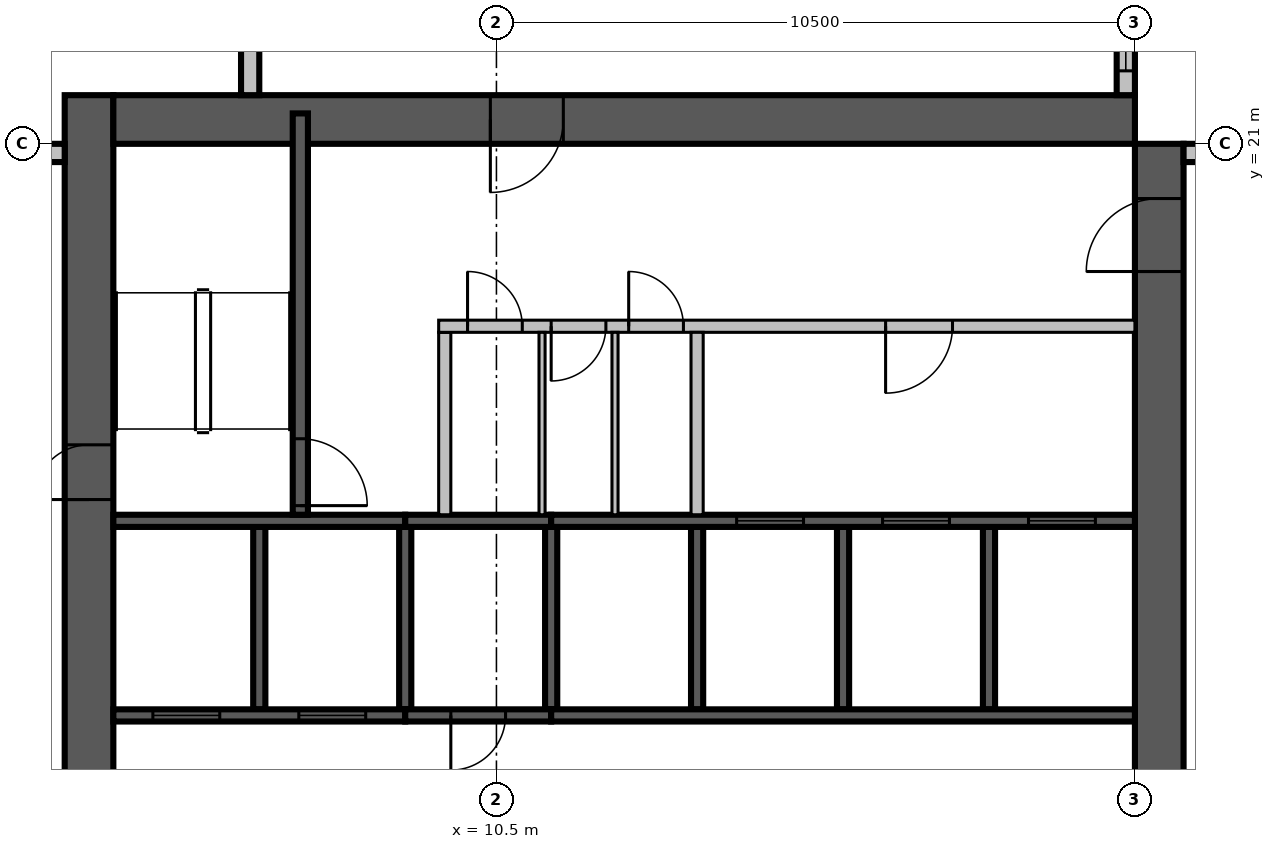
"""IFC4 building model, lengths in metres.
Left out: names, types, materials, properties, quantities, classifications, styles, units other than length and angle.
Written with IfcOpenShell. Run it as: python <this file> out.ifc"""

import sys

from ifc_helpers import new_model, si_unit, direction, frame, frame_2d, origin, place, context, subcontext, project, spatial, rectangle, extrude, source, transform, mapped, element, fill, save


model = new_model("IFC4")
c1 = context("Model", 3, precision=1e-05, world=origin(), true_north=direction((0.0, 1.0)))
c2 = subcontext(c1, "Body", "Model", "MODEL_VIEW")
j1 = project(units=[si_unit("LENGTHUNIT", "METRE"), si_unit("PLANEANGLEUNIT", "RADIAN")], contexts=[c1])
p1 = place(None, origin())
s1 = spatial("IfcSite", under=j1, at=p1, CompositionType="ELEMENT")
p2 = place(p1, origin())
s2 = spatial("IfcBuilding", under=s1, at=p2, CompositionType="ELEMENT")
p3 = place(p2, frame((0.0, 0.0, 246.2)))
s3 = spatial("IfcBuildingStorey", under=s2, at=p3, CompositionType="ELEMENT", Elevation=246.2)
m1 = source(origin(), c2, "Body", "SweptSolid", [
    extrude(rectangle(XDim=17.6, YDim=0.8, at=frame_2d((8.8, 0.0))), origin(), (0.0, 0.0, 1.0), 3.8),
])
p4 = place(p3, frame((3.8, 4.2, 0.0), z_axis=(0.0, 0.0, 1.0), x_axis=(0.0, 1.0, 0.0)))
e1 = element("IfcWall", 1, at=p4, inside=s3, PredefinedType="SHEAR", context=c2, shape_type="MappedRepresentation", body=[
    mapped(m1, transform((0.0, 0.0, 0.0), scale=1.0)),
])
m2 = source(origin(), c2, "Body", "SweptSolid", [
    extrude(rectangle(XDim=2.2, YDim=2.1, at=frame_2d((1.1, 1.05))), frame((0.0, 0.41, 0.0), z_axis=(0.0, -1.0, 0.0), x_axis=(1.0, 0.0, 0.0)), (0.0, 0.0, 1.0), 0.82),
])
p5 = place(p4, frame((4.2, 0.0, 0.0)))
e2 = element("IfcOpeningElement", 2, at=p5, cuts=e1, PredefinedType="OPENING", context=c2, shape_type="MappedRepresentation", body=[
    mapped(m2, transform((0.0, 0.0, 0.0), scale=1.0)),
])
m3 = source(origin(), c2, "Body", "SweptSolid", [
    extrude(rectangle(XDim=0.9, YDim=2.1, at=frame_2d((0.45, 1.05))), frame((0.0, 0.41, 0.0), z_axis=(0.0, -1.0, 0.0), x_axis=(1.0, 0.0, 0.0)), (0.0, 0.0, 1.0), 0.82),
])
p6 = place(p4, frame((10.95, 0.0, 0.0)))
e3 = element("IfcOpeningElement", 3, at=p6, cuts=e1, PredefinedType="OPENING", context=c2, shape_type="MappedRepresentation", body=[
    mapped(m3, transform((0.0, 0.0, 0.0), scale=1.0)),
])
m4 = source(origin(), c2, "Body", "SweptSolid", [
    extrude(rectangle(XDim=16.8, YDim=0.8, at=frame_2d((8.4, 0.0))), origin(), (0.0, 0.0, 1.0), 3.8),
])
p7 = place(p3, frame((21.4, 4.2, 0.0), z_axis=(0.0, 0.0, 1.0), x_axis=(0.0, 1.0, 0.0)))
e4 = element("IfcWall", 4, at=p7, inside=s3, PredefinedType="SHEAR", context=c2, shape_type="MappedRepresentation", body=[
    mapped(m4, transform((0.0, 0.0, 0.0), scale=1.0)),
])
p8 = place(p7, frame((4.2, 0.0, 0.0)))
e5 = element("IfcOpeningElement", 5, at=p8, cuts=e4, PredefinedType="OPENING", context=c2, shape_type="MappedRepresentation", body=[
    mapped(m2, transform((0.0, 0.0, 0.0), scale=1.0)),
])
m5 = source(origin(), c2, "Body", "SweptSolid", [
    extrude(rectangle(XDim=1.2, YDim=2.1, at=frame_2d((0.6, 1.05))), frame((0.0, 0.41, 0.0), z_axis=(0.0, -1.0, 0.0), x_axis=(1.0, 0.0, 0.0)), (0.0, 0.0, 1.0), 0.82),
])
p9 = place(p7, frame((14.7, 0.0, 0.0)))
e6 = element("IfcOpeningElement", 6, at=p9, cuts=e4, PredefinedType="OPENING", context=c2, shape_type="MappedRepresentation", body=[
    mapped(m5, transform((0.0, 0.0, 0.0), scale=1.0)),
])
p10 = place(p3, frame((4.2, 21.4, 0.0), z_axis=(0.0, 0.0, 1.0), x_axis=(1.0, 0.0, 0.0)))
e7 = element("IfcWall", 7, at=p10, inside=s3, PredefinedType="SHEAR", context=c2, shape_type="MappedRepresentation", body=[
    mapped(m4, transform((0.0, 0.0, 0.0), scale=1.0)),
])
p11 = place(p10, frame((6.2, 0.0, 0.0)))
e8 = element("IfcOpeningElement", 8, at=p11, cuts=e7, PredefinedType="OPENING", context=c2, shape_type="MappedRepresentation", body=[
    mapped(m5, transform((0.0, 0.0, 0.0), scale=1.0)),
])
m6 = source(origin(), c2, "Body", "SweptSolid", [
    extrude(rectangle(XDim=7.2, YDim=0.3, at=frame_2d((3.6, 0.0))), origin(), (0.0, 0.0, 1.0), 3.4),
])
p12 = place(p3, frame((29.0, 20.85, 0.0), z_axis=(0.0, 0.0, 1.0), x_axis=(-1.0, 0.0, 0.0)))
e9 = element("IfcWall", 9, at=p12, inside=s3, PredefinedType="STANDARD", context=c2, shape_type="MappedRepresentation", body=[
    mapped(m6, transform((0.0, 0.0, 0.0), scale=1.0)),
])
m7 = source(origin(), c2, "Body", "SweptSolid", [
    extrude(rectangle(XDim=1.8, YDim=2.3, at=frame_2d((0.9, 1.15))), frame((0.0, 0.16, 0.0), z_axis=(0.0, -1.0, 0.0), x_axis=(1.0, 0.0, 0.0)), (0.0, 0.0, 1.0), 0.32),
])
p13 = place(p12, frame((0.613, 0.0, 0.6)))
e10 = element("IfcOpeningElement", 10, at=p13, cuts=e9, PredefinedType="OPENING", context=c2, shape_type="MappedRepresentation", body=[
    mapped(m7, transform((0.0, 0.0, 0.0), scale=1.0)),
])
p14 = place(p12, frame((5.0, 0.0, 0.6)))
e11 = element("IfcOpeningElement", 11, at=p14, cuts=e9, PredefinedType="OPENING", context=c2, shape_type="MappedRepresentation", body=[
    mapped(m7, transform((0.0, 0.0, 0.0), scale=1.0)),
])
p15 = place(p3, frame((20.85, 21.8, 0.0), z_axis=(0.0, 0.0, 1.0), x_axis=(0.0, 1.0, 0.0)))
e12 = element("IfcWall", 12, at=p15, inside=s3, PredefinedType="STANDARD", context=c2, shape_type="MappedRepresentation", body=[
    mapped(m6, transform((0.0, 0.0, 0.0), scale=1.0)),
])
p16 = place(p15, frame((0.4, 0.0, 0.6)))
e13 = element("IfcOpeningElement", 13, at=p16, cuts=e12, PredefinedType="OPENING", context=c2, shape_type="MappedRepresentation", body=[
    mapped(m7, transform((0.0, 0.0, 0.0), scale=1.0)),
])
p17 = place(p15, frame((4.787, 0.0, 0.6)))
e14 = element("IfcOpeningElement", 14, at=p17, cuts=e12, PredefinedType="OPENING", context=c2, shape_type="MappedRepresentation", body=[
    mapped(m7, transform((0.0, 0.0, 0.0), scale=1.0)),
])
m8 = source(origin(), c2, "Body", "SweptSolid", [
    extrude(rectangle(XDim=16.6, YDim=0.3, at=frame_2d((8.3, 0.0))), origin(), (0.0, 0.0, 1.0), 3.4),
])
p18 = place(p3, frame((6.45, 38.4, 0.0), z_axis=(0.0, 0.0, 1.0), x_axis=(0.0, -1.0, 0.0)))
e15 = element("IfcWall", 15, at=p18, inside=s3, PredefinedType="STANDARD", context=c2, shape_type="MappedRepresentation", body=[
    mapped(m8, transform((0.0, 0.0, 0.0), scale=1.0)),
])
p19 = place(p18, frame((1.15, 0.0, 0.6)))
e16 = element("IfcOpeningElement", 16, at=p19, cuts=e15, PredefinedType="OPENING", context=c2, shape_type="MappedRepresentation", body=[
    mapped(m7, transform((0.0, 0.0, 0.0), scale=1.0)),
])
p20 = place(p18, frame((9.438, 0.0, 0.6)))
e17 = element("IfcOpeningElement", 17, at=p20, cuts=e15, PredefinedType="OPENING", context=c2, shape_type="MappedRepresentation", body=[
    mapped(m7, transform((0.0, 0.0, 0.0), scale=1.0)),
])
m9 = source(origin(), c2, "Body", "SweptSolid", [
    extrude(rectangle(XDim=3.0, YDim=2.3, at=frame_2d((1.5, 1.15))), frame((0.0, 0.16, 0.0), z_axis=(0.0, -1.0, 0.0), x_axis=(1.0, 0.0, 0.0)), (0.0, 0.0, 1.0), 0.32),
])
p21 = place(p18, frame((12.7, 0.0, 0.6)))
e18 = element("IfcOpeningElement", 18, at=p21, cuts=e15, PredefinedType="OPENING", context=c2, shape_type="MappedRepresentation", body=[
    mapped(m9, transform((0.0, 0.0, 0.0), scale=1.0)),
])
m10 = source(origin(), c2, "Body", "SweptSolid", [
    extrude(rectangle(XDim=1.0, YDim=2.1, at=frame_2d((0.5, 1.05))), frame((0.0, 0.16, 0.0), z_axis=(0.0, -1.0, 0.0), x_axis=(1.0, 0.0, 0.0)), (0.0, 0.0, 1.0), 0.32),
])
p22 = place(p18, frame((5.45, 0.0, 0.0)))
e19 = element("IfcOpeningElement", 19, at=p22, cuts=e15, PredefinedType="OPENING", context=c2, shape_type="MappedRepresentation", body=[
    mapped(m10, transform((0.0, 0.0, 0.0), scale=1.0)),
])
m11 = source(origin(), c2, "Body", "SweptSolid", [
    extrude(rectangle(XDim=2.6, YDim=0.3, at=frame_2d((1.3, 0.0))), origin(), (0.0, 0.0, 1.0), 3.4),
])
p23 = place(p3, frame((3.4, 20.85, 0.0), z_axis=(0.0, 0.0, 1.0), x_axis=(-1.0, 0.0, 0.0)))
e20 = element("IfcWall", 20, at=p23, inside=s3, PredefinedType="STANDARD", context=c2, shape_type="MappedRepresentation", body=[
    mapped(m11, transform((0.0, 0.0, 0.0), scale=1.0)),
])
p24 = place(p23, frame((0.4, 0.0, 0.6)))
e21 = element("IfcOpeningElement", 21, at=p24, cuts=e20, PredefinedType="OPENING", context=c2, shape_type="MappedRepresentation", body=[
    mapped(m7, transform((0.0, 0.0, 0.0), scale=1.0)),
])
m12 = source(origin(), c2, "Body", "SweptSolid", [
    extrude(rectangle(XDim=3.0, YDim=0.2, at=frame_2d((1.5, 0.0))), origin(), (0.0, 0.0, 1.0), 3.8),
])
p25 = place(p3, frame((6.6, 11.7, 0.0), z_axis=(0.0, 0.0, 1.0), x_axis=(0.0, 1.0, 0.0)))
e22 = element("IfcWall", 22, at=p25, inside=s3, PredefinedType="SOLIDWALL", context=c2, shape_type="MappedRepresentation", body=[
    mapped(m12, transform((0.0, 0.0, 0.0), scale=1.0)),
])
m13 = source(origin(), c2, "Body", "SweptSolid", [
    extrude(rectangle(XDim=3.0, YDim=0.2, at=frame_2d((1.5, 0.0))), origin(), (0.0, 0.0, 1.0), 3.4),
])
for number, where, z_axis, x_axis in (
    (23, (9.0, 11.7, 0.0), (0.0, 0.0, 1.0), (0.0, 1.0, 0.0)),
    (24, (11.4, 11.7, 0.0), (0.0, 0.0, 1.0), (0.0, 1.0, 0.0)),
):
    element("IfcWall", number, at=place(p3, frame(where, z_axis=z_axis, x_axis=x_axis)), inside=s3, PredefinedType="SOLIDWALL", context=c2, shape_type="MappedRepresentation", body=[
        mapped(m13, transform((0.0, 0.0, 0.0), scale=1.0)),
    ])
for number, where, z_axis, x_axis in (
    (25, (13.8, 11.7, 0.0), (0.0, 0.0, 1.0), (0.0, 1.0, 0.0)),
    (26, (16.2, 11.7, 0.0), (0.0, 0.0, 1.0), (0.0, 1.0, 0.0)),
    (27, (18.6, 11.7, 0.0), (0.0, 0.0, 1.0), (0.0, 1.0, 0.0)),
):
    element("IfcWall", number, at=place(p3, frame(where, z_axis=z_axis, x_axis=x_axis)), inside=s3, PredefinedType="SOLIDWALL", context=c2, shape_type="MappedRepresentation", body=[
        mapped(m12, transform((0.0, 0.0, 0.0), scale=1.0)),
    ])
m14 = source(origin(), c2, "Body", "SweptSolid", [
    extrude(rectangle(XDim=4.8, YDim=0.2, at=frame_2d((2.4, 0.0))), origin(), (0.0, 0.0, 1.0), 3.8),
])
p26 = place(p3, frame((4.2, 11.6, 0.0), z_axis=(0.0, 0.0, 1.0), x_axis=(1.0, 0.0, 0.0)))
e28 = element("IfcWall", 28, at=p26, inside=s3, PredefinedType="SOLIDWALL", context=c2, shape_type="MappedRepresentation", body=[
    mapped(m14, transform((0.0, 0.0, 0.0), scale=1.0)),
])
m15 = source(origin(), c2, "Body", "SweptSolid", [
    extrude(rectangle(XDim=1.1, YDim=2.1, at=frame_2d((0.55, 1.05))), frame((0.0, 0.11, 0.0), z_axis=(0.0, -1.0, 0.0), x_axis=(1.0, 0.0, 0.0)), (0.0, 0.0, 1.0), 0.22),
])
p27 = place(p26, frame((0.65, 0.0, 0.0)))
e29 = element("IfcOpeningElement", 29, at=p27, cuts=e28, PredefinedType="OPENING", context=c2, shape_type="MappedRepresentation", body=[
    mapped(m15, transform((0.0, 0.0, 0.0), scale=1.0)),
])
p28 = place(p26, frame((3.05, 0.0, 0.0)))
e30 = element("IfcOpeningElement", 30, at=p28, cuts=e28, PredefinedType="OPENING", context=c2, shape_type="MappedRepresentation", body=[
    mapped(m15, transform((0.0, 0.0, 0.0), scale=1.0)),
])
m16 = source(origin(), c2, "Body", "SweptSolid", [
    extrude(rectangle(XDim=2.4, YDim=0.2, at=frame_2d((1.2, 0.0))), origin(), (0.0, 0.0, 1.0), 3.4),
])
p29 = place(p3, frame((9.0, 11.6, 0.0), z_axis=(0.0, 0.0, 1.0), x_axis=(1.0, 0.0, 0.0)))
e31 = element("IfcWall", 31, at=p29, inside=s3, PredefinedType="SOLIDWALL", context=c2, shape_type="MappedRepresentation", body=[
    mapped(m16, transform((0.0, 0.0, 0.0), scale=1.0)),
])
m17 = source(origin(), c2, "Body", "SweptSolid", [
    extrude(rectangle(XDim=0.9, YDim=2.1, at=frame_2d((0.45, 1.05))), frame((0.0, 0.11, 0.0), z_axis=(0.0, -1.0, 0.0), x_axis=(1.0, 0.0, 0.0)), (0.0, 0.0, 1.0), 0.22),
])
p30 = place(p29, frame((0.75, 0.0, 0.0)))
e32 = element("IfcOpeningElement", 32, at=p30, cuts=e31, PredefinedType="OPENING", context=c2, shape_type="MappedRepresentation", body=[
    mapped(m17, transform((0.0, 0.0, 0.0), scale=1.0)),
])
m18 = source(origin(), c2, "Body", "SweptSolid", [
    extrude(rectangle(XDim=9.6, YDim=0.2, at=frame_2d((4.8, 0.0))), origin(), (0.0, 0.0, 1.0), 3.8),
])
p31 = place(p3, frame((11.4, 11.6, 0.0), z_axis=(0.0, 0.0, 1.0), x_axis=(1.0, 0.0, 0.0)))
e33 = element("IfcWall", 33, at=p31, inside=s3, PredefinedType="SOLIDWALL", context=c2, shape_type="MappedRepresentation", body=[
    mapped(m18, transform((0.0, 0.0, 0.0), scale=1.0)),
])
p32 = place(p3, frame((4.2, 14.8, 0.0), z_axis=(0.0, 0.0, 1.0), x_axis=(1.0, 0.0, 0.0)))
e34 = element("IfcWall", 34, at=p32, inside=s3, PredefinedType="SOLIDWALL", context=c2, shape_type="MappedRepresentation", body=[
    mapped(m14, transform((0.0, 0.0, 0.0), scale=1.0)),
])
p33 = place(p3, frame((9.0, 14.8, 0.0), z_axis=(0.0, 0.0, 1.0), x_axis=(1.0, 0.0, 0.0)))
e35 = element("IfcWall", 35, at=p33, inside=s3, PredefinedType="SOLIDWALL", context=c2, shape_type="MappedRepresentation", body=[
    mapped(m16, transform((0.0, 0.0, 0.0), scale=1.0)),
])
p34 = place(p3, frame((11.4, 14.8, 0.0), z_axis=(0.0, 0.0, 1.0), x_axis=(1.0, 0.0, 0.0)))
e36 = element("IfcWall", 36, at=p34, inside=s3, PredefinedType="SOLIDWALL", context=c2, shape_type="MappedRepresentation", body=[
    mapped(m18, transform((0.0, 0.0, 0.0), scale=1.0)),
])
p35 = place(p34, frame((3.05, 0.0, 0.0)))
e37 = element("IfcOpeningElement", 37, at=p35, cuts=e36, PredefinedType="OPENING", context=c2, shape_type="MappedRepresentation", body=[
    mapped(m15, transform((0.0, 0.0, 0.0), scale=1.0)),
])
p36 = place(p34, frame((5.45, 0.0, 0.0)))
e38 = element("IfcOpeningElement", 38, at=p36, cuts=e36, PredefinedType="OPENING", context=c2, shape_type="MappedRepresentation", body=[
    mapped(m15, transform((0.0, 0.0, 0.0), scale=1.0)),
])
p37 = place(p34, frame((7.85, 0.0, 0.0)))
e39 = element("IfcOpeningElement", 39, at=p37, cuts=e36, PredefinedType="OPENING", context=c2, shape_type="MappedRepresentation", body=[
    mapped(m15, transform((0.0, 0.0, 0.0), scale=1.0)),
])
m19 = source(origin(), c2, "Body", "SweptSolid", [
    extrude(rectangle(XDim=6.6, YDim=0.25, at=frame_2d((3.3, 0.0))), origin(), (0.0, 0.0, 1.0), 3.4),
])
p38 = place(p3, frame((7.275, 14.9, 0.0), z_axis=(0.0, 0.0, 1.0), x_axis=(0.0, 1.0, 0.0)))
e40 = element("IfcWall", 40, at=p38, inside=s3, PredefinedType="SOLIDWALL", context=c2, shape_type="MappedRepresentation", body=[
    mapped(m19, transform((0.0, 0.0, 0.0), scale=1.0)),
])
m20 = source(origin(), c2, "Body", "SweptSolid", [
    extrude(rectangle(XDim=1.1, YDim=2.1, at=frame_2d((0.55, 1.05))), frame((0.0, 0.135, 0.0), z_axis=(0.0, -1.0, 0.0), x_axis=(1.0, 0.0, 0.0)), (0.0, 0.0, 1.0), 0.27),
])
p39 = place(p38, frame((0.15, 0.0, 0.0)))
e41 = element("IfcOpeningElement", 41, at=p39, cuts=e40, PredefinedType="OPENING", context=c2, shape_type="MappedRepresentation", body=[
    mapped(m20, transform((0.0, 0.0, 0.0), scale=1.0)),
])
m21 = source(origin(), c2, "Body", "SweptSolid", [
    extrude(rectangle(XDim=3.0, YDim=0.2, at=frame_2d((1.5, 0.0))), origin(), (0.0, 0.0, 1.0), 3.4),
])
p40 = place(p3, frame((9.65, 14.9, 0.0), z_axis=(0.0, 0.0, 1.0), x_axis=(0.0, 1.0, 0.0)))
e42 = element("IfcWall", 42, at=p40, inside=s3, PredefinedType="PARTITIONING", context=c2, shape_type="MappedRepresentation", body=[
    mapped(m21, transform((0.0, 0.0, 0.0), scale=1.0)),
])
m22 = source(origin(), c2, "Body", "SweptSolid", [
    extrude(rectangle(XDim=11.45, YDim=0.2, at=frame_2d((5.725, 0.0))), origin(), (0.0, 0.0, 1.0), 3.4),
])
p41 = place(p3, frame((9.55, 18.0, 0.0), z_axis=(0.0, 0.0, 1.0), x_axis=(1.0, 0.0, 0.0)))
e43 = element("IfcWall", 43, at=p41, inside=s3, PredefinedType="PARTITIONING", context=c2, shape_type="MappedRepresentation", body=[
    mapped(m22, transform((0.0, 0.0, 0.0), scale=1.0)),
])
p42 = place(p41, frame((0.475, 0.0, 0.0)))
e44 = element("IfcOpeningElement", 44, at=p42, cuts=e43, PredefinedType="OPENING", context=c2, shape_type="MappedRepresentation", body=[
    mapped(m17, transform((0.0, 0.0, 0.0), scale=1.0)),
])
p43 = place(p41, frame((1.85, 0.0, 0.0)))
e45 = element("IfcOpeningElement", 45, at=p43, cuts=e43, PredefinedType="OPENING", context=c2, shape_type="MappedRepresentation", body=[
    mapped(m17, transform((0.0, 0.0, 0.0), scale=1.0)),
])
p44 = place(p41, frame((3.125, 0.0, 0.0)))
e46 = element("IfcOpeningElement", 46, at=p44, cuts=e43, PredefinedType="OPENING", context=c2, shape_type="MappedRepresentation", body=[
    mapped(m17, transform((0.0, 0.0, 0.0), scale=1.0)),
])
p45 = place(p41, frame((7.35, 0.0, 0.0)))
e47 = element("IfcOpeningElement", 47, at=p45, cuts=e43, PredefinedType="OPENING", context=c2, shape_type="MappedRepresentation", body=[
    mapped(m15, transform((0.0, 0.0, 0.0), scale=1.0)),
])
p46 = place(p3, frame((13.8, 14.9, 0.0), z_axis=(0.0, 0.0, 1.0), x_axis=(0.0, 1.0, 0.0)))
e48 = element("IfcWall", 48, at=p46, inside=s3, PredefinedType="PARTITIONING", context=c2, shape_type="MappedRepresentation", body=[
    mapped(m21, transform((0.0, 0.0, 0.0), scale=1.0)),
])
m23 = source(origin(), c2, "Body", "SweptSolid", [
    extrude(rectangle(XDim=3.0, YDim=0.1, at=frame_2d((1.5, 0.0))), origin(), (0.0, 0.0, 1.0), 3.4),
])
for number, where, z_axis, x_axis in (
    (49, (11.25, 14.9, 0.0), (0.0, 0.0, 1.0), (0.0, 1.0, 0.0)),
    (50, (12.45, 14.9, 0.0), (0.0, 0.0, 1.0), (0.0, 1.0, 0.0)),
):
    element("IfcWall", number, at=place(p3, frame(where, z_axis=z_axis, x_axis=x_axis)), inside=s3, PredefinedType="PARTITIONING", context=c2, shape_type="MappedRepresentation", body=[
        mapped(m23, transform((0.0, 0.0, 0.0), scale=1.0)),
    ])
m24 = source(origin(), c2, "Body", "SweptSolid", [
    extrude(rectangle(XDim=1.8, YDim=2.3, at=frame_2d((0.9, 1.15))), frame((0.0, 0.03, 0.0), z_axis=(0.0, -1.0, 0.0), x_axis=(1.0, 0.0, 0.0)), (0.0, 0.0, 1.0), 0.06),
])
p47 = place(p16, origin())
e51 = element("IfcWindow", 51, at=p47, inside=s3, PartitioningType="SINGLE_PANEL", PredefinedType="WINDOW", context=c2, shape_type="MappedRepresentation", body=[
    mapped(m24, transform((0.0, 0.0, 0.0), scale=1.0)),
])
fill(e13, e51)
m25 = source(origin(), c2, "Body", "SweptSolid", [
    extrude(rectangle(XDim=1.1, YDim=2.1, at=frame_2d((0.55, 1.05))), frame((0.0, 0.025, 0.0), z_axis=(0.0, -1.0, 0.0), x_axis=(1.0, 0.0, 0.0)), (0.0, 0.0, 1.0), 0.05),
])
p48 = place(p27, origin())
e52 = element("IfcDoor", 52, at=p48, inside=s3, OperationType="SLIDING_TO_LEFT", PredefinedType="DOOR", context=c2, shape_type="MappedRepresentation", body=[
    mapped(m25, transform((0.0, 0.0, 0.0), scale=1.0)),
])
fill(e29, e52)
p49 = place(p28, origin())
e53 = element("IfcDoor", 53, at=p49, inside=s3, OperationType="SLIDING_TO_LEFT", PredefinedType="DOOR", context=c2, shape_type="MappedRepresentation", body=[
    mapped(m25, transform((0.0, 0.0, 0.0), scale=1.0)),
])
fill(e30, e53)
m26 = source(origin(), c2, "Body", "SweptSolid", [
    extrude(rectangle(XDim=0.9, YDim=2.1, at=frame_2d((0.45, 1.05))), frame((0.0, 0.025, 0.0), z_axis=(0.0, -1.0, 0.0), x_axis=(1.0, 0.0, 0.0)), (0.0, 0.0, 1.0), 0.05),
])
p50 = place(p30, origin())
e54 = element("IfcDoor", 54, at=p50, inside=s3, OperationType="SINGLE_SWING_RIGHT", PredefinedType="DOOR", context=c2, shape_type="MappedRepresentation", body=[
    mapped(m26, transform((0.0, 0.0, 0.0), scale=1.0)),
])
fill(e32, e54)
p51 = place(p35, origin())
e55 = element("IfcDoor", 55, at=p51, inside=s3, OperationType="SLIDING_TO_LEFT", PredefinedType="DOOR", context=c2, shape_type="MappedRepresentation", body=[
    mapped(m25, transform((0.0, 0.0, 0.0), scale=1.0)),
])
fill(e37, e55)
p52 = place(p36, origin())
e56 = element("IfcDoor", 56, at=p52, inside=s3, OperationType="SLIDING_TO_LEFT", PredefinedType="DOOR", context=c2, shape_type="MappedRepresentation", body=[
    mapped(m25, transform((0.0, 0.0, 0.0), scale=1.0)),
])
fill(e38, e56)
p53 = place(p37, origin())
e57 = element("IfcDoor", 57, at=p53, inside=s3, OperationType="SLIDING_TO_LEFT", PredefinedType="DOOR", context=c2, shape_type="MappedRepresentation", body=[
    mapped(m25, transform((0.0, 0.0, 0.0), scale=1.0)),
])
fill(e39, e57)
p54 = place(p39, origin())
e58 = element("IfcDoor", 58, at=p54, inside=s3, OperationType="SINGLE_SWING_RIGHT", PredefinedType="DOOR", context=c2, shape_type="MappedRepresentation", body=[
    mapped(m25, transform((0.0, 0.0, 0.0), scale=1.0)),
])
fill(e41, e58)
p55 = place(p42, origin())
e59 = element("IfcDoor", 59, at=p55, inside=s3, OperationType="SINGLE_SWING_LEFT", PredefinedType="DOOR", context=c2, shape_type="MappedRepresentation", body=[
    mapped(m26, transform((0.0, 0.0, 0.0), scale=1.0)),
])
fill(e44, e59)
p56 = place(p43, origin())
e60 = element("IfcDoor", 60, at=p56, inside=s3, OperationType="SINGLE_SWING_RIGHT", PredefinedType="DOOR", context=c2, shape_type="MappedRepresentation", body=[
    mapped(m26, transform((0.0, 0.0, 0.0), scale=1.0)),
])
fill(e45, e60)
p57 = place(p44, origin())
e61 = element("IfcDoor", 61, at=p57, inside=s3, OperationType="SINGLE_SWING_LEFT", PredefinedType="DOOR", context=c2, shape_type="MappedRepresentation", body=[
    mapped(m26, transform((0.0, 0.0, 0.0), scale=1.0)),
])
fill(e46, e61)
p58 = place(p45, origin())
e62 = element("IfcDoor", 62, at=p58, inside=s3, OperationType="SINGLE_SWING_RIGHT", PredefinedType="DOOR", context=c2, shape_type="MappedRepresentation", body=[
    mapped(m25, transform((0.0, 0.0, 0.0), scale=1.0)),
])
fill(e47, e62)
m27 = source(origin(), c2, "Body", "SweptSolid", [
    extrude(rectangle(XDim=1.2, YDim=2.1, at=frame_2d((0.6, 1.05))), frame((0.0, 0.025, 0.0), z_axis=(0.0, -1.0, 0.0), x_axis=(1.0, 0.0, 0.0)), (0.0, 0.0, 1.0), 0.05),
])
p59 = place(p11, origin())
e63 = element("IfcDoor", 63, at=p59, inside=s3, OperationType="SINGLE_SWING_RIGHT", PredefinedType="DOOR", context=c2, shape_type="MappedRepresentation", body=[
    mapped(m27, transform((0.0, 0.0, 0.0), scale=1.0)),
])
fill(e8, e63)
p60 = place(p9, origin())
e64 = element("IfcDoor", 64, at=p60, inside=s3, OperationType="SINGLE_SWING_LEFT", PredefinedType="DOOR", context=c2, shape_type="MappedRepresentation", body=[
    mapped(m27, transform((0.0, 0.0, 0.0), scale=1.0)),
])
fill(e6, e64)
p61 = place(p6, origin())
e65 = element("IfcDoor", 65, at=p61, inside=s3, OperationType="SINGLE_SWING_LEFT", PredefinedType="DOOR", context=c2, shape_type="MappedRepresentation", body=[
    mapped(m26, transform((0.0, 0.0, 0.0), scale=1.0)),
])
fill(e3, e65)
save(model, sys.argv[1])
